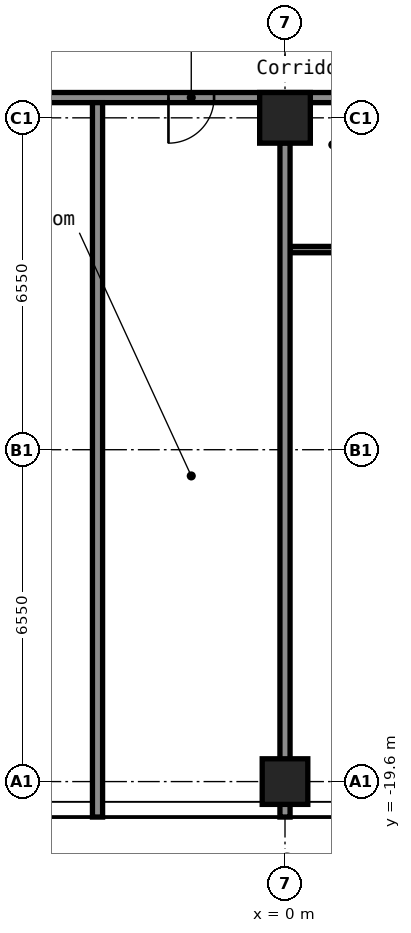
"""IFC4 building model, lengths in metres.
Left out: names, types, materials, properties, quantities, classifications, styles, units other than length and angle.
Written with IfcOpenShell. Run it as: python <this file> out.ifc"""

import sys

from ifc_helpers import new_model, si_unit, direction, frame, frame_2d, origin, origin_2d, place, context, subcontext, project, spatial, rectangle, hollow_rectangle, extrude, element, fill, save


model = new_model("IFC4")
c1 = context("Model", 3, precision=1e-05, world=origin(), true_north=direction((0.0, 1.0)))
c2 = subcontext(c1, "Body", "Model", "MODEL_VIEW")
j1 = project(units=[si_unit("LENGTHUNIT", "METRE"), si_unit("PLANEANGLEUNIT", "RADIAN")], contexts=[c1])
p1 = place(None, origin())
s1 = spatial("IfcSite", under=j1, at=p1, CompositionType="ELEMENT")
p2 = place(p1, origin())
s2 = spatial("IfcBuilding", under=s1, at=p2, CompositionType="ELEMENT")
p3 = place(p2, frame((0.0, 0.0, 45.4)))
s3 = spatial("IfcBuildingStorey", under=s2, at=p3, CompositionType="ELEMENT", Elevation=45.4)
p4 = place(p3, frame((0.0, -19.6, 0.0), z_axis=(0.0, 0.0, 1.0), x_axis=(1.0, 0.0, 0.0)))
e1 = element("IfcColumn", 1, at=p4, inside=s3, PredefinedType="COLUMN", context=c2, shape_type="SweptSolid", body=[
    extrude(hollow_rectangle(XDim=0.9, YDim=0.9, WallThickness=0.036, at=origin_2d()), origin(), (0.0, 0.0, 1.0), 2.8),
])
p5 = place(p3, frame((0.0, -6.5, 0.0), z_axis=(0.0, 0.0, 1.0), x_axis=(1.0, 0.0, 0.0)))
e2 = element("IfcColumn", 2, at=p5, inside=s3, PredefinedType="COLUMN", context=c2, shape_type="SweptSolid", body=[
    extrude(hollow_rectangle(XDim=1.0, YDim=1.0, WallThickness=0.04, at=origin_2d()), origin(), (0.0, 0.0, 1.0), 2.8),
])
p6 = place(p3, frame((0.1, -9.1, 0.0), z_axis=(0.0, 0.0, 1.0), x_axis=(1.0, 0.0, 0.0)))
e3 = element("IfcWall", 3, at=p6, inside=s3, PredefinedType="PARTITIONING", context=c2, shape_type="SweptSolid", body=[
    extrude(rectangle(XDim=2.337, YDim=0.125, at=frame_2d((1.169, 0.0))), origin(), (0.0, 0.0, 1.0), 2.8),
])
p7 = place(p3, frame((-16.8, -6.1, 0.0), z_axis=(0.0, 0.0, 1.0), x_axis=(1.0, 0.0, 0.0)))
e4 = element("IfcWall", 4, at=p7, inside=s3, PredefinedType="PARTITIONING", context=c2, shape_type="SweptSolid", body=[
    extrude(rectangle(XDim=33.6, YDim=0.2, at=frame_2d((16.8, 0.0))), origin(), (0.0, 0.0, 1.0), 2.8),
])
p8 = place(p7, frame((2.85, 0.0, 0.0)))
e5 = element("IfcOpeningElement", 5, at=p8, cuts=e4, PredefinedType="OPENING", context=c2, shape_type="SweptSolid", body=[
    extrude(rectangle(XDim=1.0, YDim=2.1, at=frame_2d((0.5, 1.05))), frame((0.0, 0.11, 0.0), z_axis=(0.0, -1.0, 0.0), x_axis=(1.0, 0.0, 0.0)), (0.0, 0.0, 1.0), 0.22),
])
p9 = place(p7, frame((4.55, 0.0, 0.0)))
e6 = element("IfcOpeningElement", 6, at=p9, cuts=e4, PredefinedType="OPENING", context=c2, shape_type="SweptSolid", body=[
    extrude(rectangle(XDim=1.0, YDim=2.1, at=frame_2d((0.5, 1.05))), frame((0.0, 0.11, 0.0), z_axis=(0.0, -1.0, 0.0), x_axis=(1.0, 0.0, 0.0)), (0.0, 0.0, 1.0), 0.22),
])
p10 = place(p7, frame((10.3, 0.0, 0.0)))
e7 = element("IfcOpeningElement", 7, at=p10, cuts=e4, PredefinedType="OPENING", context=c2, shape_type="SweptSolid", body=[
    extrude(rectangle(XDim=0.9, YDim=2.1, at=frame_2d((0.45, 1.05))), frame((0.0, 0.11, 0.0), z_axis=(0.0, -1.0, 0.0), x_axis=(1.0, 0.0, 0.0)), (0.0, 0.0, 1.0), 0.22),
])
p11 = place(p7, frame((14.5, 0.0, 0.0)))
e8 = element("IfcOpeningElement", 8, at=p11, cuts=e4, PredefinedType="OPENING", context=c2, shape_type="SweptSolid", body=[
    extrude(rectangle(XDim=0.9, YDim=2.1, at=frame_2d((0.45, 1.05))), frame((0.0, 0.11, 0.0), z_axis=(0.0, -1.0, 0.0), x_axis=(1.0, 0.0, 0.0)), (0.0, 0.0, 1.0), 0.22),
])
p12 = place(p7, frame((19.65, 0.0, 0.0)))
e9 = element("IfcOpeningElement", 9, at=p12, cuts=e4, PredefinedType="OPENING", context=c2, shape_type="SweptSolid", body=[
    extrude(rectangle(XDim=1.0, YDim=2.1, at=frame_2d((0.5, 1.05))), frame((0.0, 0.11, 0.0), z_axis=(0.0, -1.0, 0.0), x_axis=(1.0, 0.0, 0.0)), (0.0, 0.0, 1.0), 0.22),
])
p13 = place(p7, frame((21.35, 0.0, 0.0)))
e10 = element("IfcOpeningElement", 10, at=p13, cuts=e4, PredefinedType="OPENING", context=c2, shape_type="SweptSolid", body=[
    extrude(rectangle(XDim=1.0, YDim=2.1, at=frame_2d((0.5, 1.05))), frame((0.0, 0.11, 0.0), z_axis=(0.0, -1.0, 0.0), x_axis=(1.0, 0.0, 0.0)), (0.0, 0.0, 1.0), 0.22),
])
p14 = place(p7, frame((30.6, 0.0, 0.0)))
e11 = element("IfcOpeningElement", 11, at=p14, cuts=e4, PredefinedType="OPENING", context=c2, shape_type="SweptSolid", body=[
    extrude(rectangle(XDim=1.0, YDim=2.1, at=frame_2d((0.5, 1.05))), frame((0.0, 0.11, 0.0), z_axis=(0.0, -1.0, 0.0), x_axis=(1.0, 0.0, 0.0)), (0.0, 0.0, 1.0), 0.22),
])
p15 = place(p3, frame((-3.7, -20.3, 0.0), z_axis=(0.0, 0.0, 1.0), x_axis=(0.0, 1.0, 0.0)))
e12 = element("IfcWall", 12, at=p15, inside=s3, PredefinedType="PARTITIONING", context=c2, shape_type="SweptSolid", body=[
    extrude(rectangle(XDim=14.1, YDim=0.2, at=frame_2d((7.05, 0.0))), origin(), (0.0, 0.0, 1.0), 2.8),
])
p16 = place(p3, frame((0.0, -20.3, 0.0), z_axis=(0.0, 0.0, 1.0), x_axis=(0.0, 1.0, 0.0)))
e13 = element("IfcWall", 13, at=p16, inside=s3, PredefinedType="PARTITIONING", context=c2, shape_type="SweptSolid", body=[
    extrude(rectangle(XDim=13.31, YDim=0.2, at=frame_2d((6.655, 0.0))), origin(), (0.0, 0.0, 1.0), 2.8),
])
p17 = place(p11, origin())
e14 = element("IfcDoor", 14, at=p17, inside=s3, OperationType="SINGLE_SWING_LEFT", PredefinedType="DOOR", context=c2, shape_type="SweptSolid", body=[
    extrude(rectangle(XDim=0.9, YDim=2.1, at=frame_2d((0.45, 1.05))), frame((0.0, 0.025, 0.0), z_axis=(0.0, -1.0, 0.0), x_axis=(1.0, 0.0, 0.0)), (0.0, 0.0, 1.0), 0.05),
])
fill(e8, e14)
save(model, sys.argv[1])
